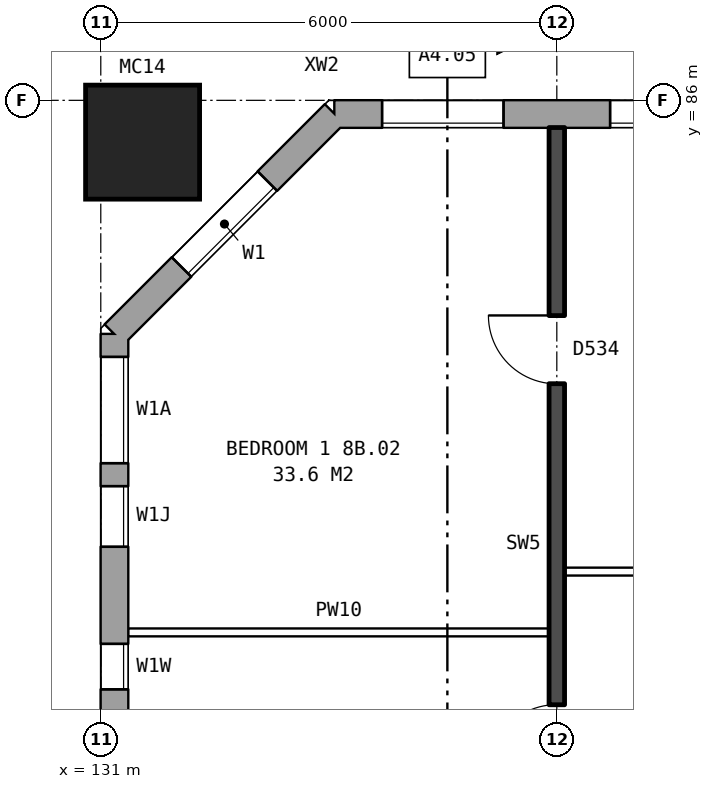
"""IFC4 building model, lengths in metres.
Left out: names, types, materials, properties, quantities, classifications, styles, units other than length and angle.
Written with IfcOpenShell. Run it as: python <this file> out.ifc"""

import sys

from ifc_helpers import new_model, si_unit, direction, frame, frame_2d, origin, origin_2d, place, context, subcontext, project, spatial, rectangle, hollow_rectangle, extrude, element, fill, save


model = new_model("IFC4")
c1 = context("Model", 3, precision=1e-05, world=origin(), true_north=direction((0.0, 1.0)))
c2 = subcontext(c1, "Body", "Model", "MODEL_VIEW")
j1 = project(units=[si_unit("LENGTHUNIT", "METRE"), si_unit("PLANEANGLEUNIT", "RADIAN")], contexts=[c1])
p1 = place(None, origin())
s1 = spatial("IfcSite", under=j1, at=p1, CompositionType="ELEMENT")
p2 = place(p1, origin())
s2 = spatial("IfcBuilding", under=s1, at=p2, CompositionType="ELEMENT")
p3 = place(p2, frame((0.0, 0.0, 31.9)))
s3 = spatial("IfcBuildingStorey", under=s2, at=p3, CompositionType="ELEMENT", Elevation=31.9)
p4 = place(p3, frame((131.55, 85.45, 0.0), z_axis=(0.0, 0.0, 1.0), x_axis=(1.0, 0.0, 0.0)))
e1 = element("IfcColumn", 1, at=p4, inside=s3, PredefinedType="COLUMN", context=c2, shape_type="SweptSolid", body=[
    extrude(hollow_rectangle(XDim=1.5, YDim=1.5, WallThickness=0.08, at=origin_2d()), origin(), (0.0, 0.0, 1.0), 3.1),
])
p5 = place(p3, frame((174.675, 85.82, 0.0), z_axis=(0.0, 0.0, 1.0), x_axis=(-1.0, 0.0, 0.0)))
e2 = element("IfcWall", 2, at=p5, inside=s3, PredefinedType="STANDARD", context=c2, shape_type="SweptSolid", body=[
    extrude(rectangle(XDim=40.601, YDim=0.36, at=frame_2d((20.3, 0.0))), origin(), (0.0, 0.0, 1.0), 2.85),
])
p6 = place(p5, frame((2.375, 0.0, 0.8)))
e3 = element("IfcOpeningElement", 3, at=p6, cuts=e2, PredefinedType="OPENING", context=c2, shape_type="SweptSolid", body=[
    extrude(rectangle(XDim=1.6, YDim=1.8, at=frame_2d((0.8, 0.9))), frame((0.0, 0.19, 0.0), z_axis=(0.0, -1.0, 0.0), x_axis=(1.0, 0.0, 0.0)), (0.0, 0.0, 1.0), 0.38),
])
p7 = place(p5, frame((5.375, 0.0, 0.8)))
e4 = element("IfcOpeningElement", 4, at=p7, cuts=e2, PredefinedType="OPENING", context=c2, shape_type="SweptSolid", body=[
    extrude(rectangle(XDim=1.6, YDim=1.8, at=frame_2d((0.8, 0.9))), frame((0.0, 0.19, 0.0), z_axis=(0.0, -1.0, 0.0), x_axis=(1.0, 0.0, 0.0)), (0.0, 0.0, 1.0), 0.38),
])
p8 = place(p5, frame((8.375, 0.0, 0.8)))
e5 = element("IfcOpeningElement", 5, at=p8, cuts=e2, PredefinedType="OPENING", context=c2, shape_type="SweptSolid", body=[
    extrude(rectangle(XDim=1.6, YDim=1.8, at=frame_2d((0.8, 0.9))), frame((0.0, 0.19, 0.0), z_axis=(0.0, -1.0, 0.0), x_axis=(1.0, 0.0, 0.0)), (0.0, 0.0, 1.0), 0.38),
])
p9 = place(p5, frame((11.375, 0.0, 0.8)))
e6 = element("IfcOpeningElement", 6, at=p9, cuts=e2, PredefinedType="OPENING", context=c2, shape_type="SweptSolid", body=[
    extrude(rectangle(XDim=1.6, YDim=1.8, at=frame_2d((0.8, 0.9))), frame((0.0, 0.19, 0.0), z_axis=(0.0, -1.0, 0.0), x_axis=(1.0, 0.0, 0.0)), (0.0, 0.0, 1.0), 0.38),
])
p10 = place(p5, frame((13.875, 0.0, 1.7)))
e7 = element("IfcOpeningElement", 7, at=p10, cuts=e2, PredefinedType="OPENING", context=c2, shape_type="SweptSolid", body=[
    extrude(rectangle(XDim=0.6, YDim=0.9, at=frame_2d((0.3, 0.45))), frame((0.0, 0.19, 0.0), z_axis=(0.0, -1.0, 0.0), x_axis=(1.0, 0.0, 0.0)), (0.0, 0.0, 1.0), 0.38),
])
p11 = place(p5, frame((17.375, 0.0, 0.8)))
e8 = element("IfcOpeningElement", 8, at=p11, cuts=e2, PredefinedType="OPENING", context=c2, shape_type="SweptSolid", body=[
    extrude(rectangle(XDim=1.6, YDim=1.8, at=frame_2d((0.8, 0.9))), frame((0.0, 0.19, 0.0), z_axis=(0.0, -1.0, 0.0), x_axis=(1.0, 0.0, 0.0)), (0.0, 0.0, 1.0), 0.38),
])
p12 = place(p5, frame((20.375, 0.0, 0.8)))
e9 = element("IfcOpeningElement", 9, at=p12, cuts=e2, PredefinedType="OPENING", context=c2, shape_type="SweptSolid", body=[
    extrude(rectangle(XDim=1.6, YDim=1.8, at=frame_2d((0.8, 0.9))), frame((0.0, 0.19, 0.0), z_axis=(0.0, -1.0, 0.0), x_axis=(1.0, 0.0, 0.0)), (0.0, 0.0, 1.0), 0.38),
])
p13 = place(p5, frame((22.825, 0.0, 0.55)))
e10 = element("IfcOpeningElement", 10, at=p13, cuts=e2, PredefinedType="OPENING", context=c2, shape_type="SweptSolid", body=[
    extrude(rectangle(XDim=1.2, YDim=1.8, at=frame_2d((0.6, 0.9))), frame((0.0, 0.19, 0.0), z_axis=(0.0, -1.0, 0.0), x_axis=(1.0, 0.0, 0.0)), (0.0, 0.0, 1.0), 0.38),
])
p14 = place(p5, frame((26.075, 0.0, 1.7)))
e11 = element("IfcOpeningElement", 11, at=p14, cuts=e2, PredefinedType="OPENING", context=c2, shape_type="SweptSolid", body=[
    extrude(rectangle(XDim=0.8, YDim=0.9, at=frame_2d((0.4, 0.45))), frame((0.0, 0.19, 0.0), z_axis=(0.0, -1.0, 0.0), x_axis=(1.0, 0.0, 0.0)), (0.0, 0.0, 1.0), 0.38),
])
p15 = place(p5, frame((29.375, 0.0, 0.8)))
e12 = element("IfcOpeningElement", 12, at=p15, cuts=e2, PredefinedType="OPENING", context=c2, shape_type="SweptSolid", body=[
    extrude(rectangle(XDim=1.6, YDim=1.8, at=frame_2d((0.8, 0.9))), frame((0.0, 0.19, 0.0), z_axis=(0.0, -1.0, 0.0), x_axis=(1.0, 0.0, 0.0)), (0.0, 0.0, 1.0), 0.38),
])
p16 = place(p5, frame((32.375, 0.0, 0.8)))
e13 = element("IfcOpeningElement", 13, at=p16, cuts=e2, PredefinedType="OPENING", context=c2, shape_type="SweptSolid", body=[
    extrude(rectangle(XDim=1.6, YDim=1.8, at=frame_2d((0.8, 0.9))), frame((0.0, 0.19, 0.0), z_axis=(0.0, -1.0, 0.0), x_axis=(1.0, 0.0, 0.0)), (0.0, 0.0, 1.0), 0.38),
])
p17 = place(p5, frame((35.375, 0.0, 0.8)))
e14 = element("IfcOpeningElement", 14, at=p17, cuts=e2, PredefinedType="OPENING", context=c2, shape_type="SweptSolid", body=[
    extrude(rectangle(XDim=1.6, YDim=1.8, at=frame_2d((0.8, 0.9))), frame((0.0, 0.19, 0.0), z_axis=(0.0, -1.0, 0.0), x_axis=(1.0, 0.0, 0.0)), (0.0, 0.0, 1.0), 0.38),
])
p18 = place(p5, frame((38.375, 0.0, 0.8)))
e15 = element("IfcOpeningElement", 15, at=p18, cuts=e2, PredefinedType="OPENING", context=c2, shape_type="SweptSolid", body=[
    extrude(rectangle(XDim=1.6, YDim=1.8, at=frame_2d((0.8, 0.9))), frame((0.0, 0.19, 0.0), z_axis=(0.0, -1.0, 0.0), x_axis=(1.0, 0.0, 0.0)), (0.0, 0.0, 1.0), 0.38),
])
p19 = place(p5, frame((15.775, 0.0, 0.8)))
e16 = element("IfcOpeningElement", 16, at=p19, cuts=e2, PredefinedType="OPENING", context=c2, shape_type="SweptSolid", body=[
    extrude(rectangle(XDim=1.2, YDim=0.9, at=frame_2d((0.6, 0.45))), frame((0.0, 0.19, 0.0), z_axis=(0.0, -1.0, 0.0), x_axis=(1.0, 0.0, 0.0)), (0.0, 0.0, 1.0), 0.38),
])
p20 = place(p5, frame((24.325, 0.0, 0.55)))
e17 = element("IfcOpeningElement", 17, at=p20, cuts=e2, PredefinedType="OPENING", context=c2, shape_type="SweptSolid", body=[
    extrude(rectangle(XDim=0.8, YDim=0.9, at=frame_2d((0.4, 0.45))), frame((0.0, 0.19, 0.0), z_axis=(0.0, -1.0, 0.0), x_axis=(1.0, 0.0, 0.0)), (0.0, 0.0, 1.0), 0.38),
])
p21 = place(p5, frame((27.175, 0.0, 0.8)))
e18 = element("IfcOpeningElement", 18, at=p21, cuts=e2, PredefinedType="OPENING", context=c2, shape_type="SweptSolid", body=[
    extrude(rectangle(XDim=1.2, YDim=1.8, at=frame_2d((0.6, 0.9))), frame((0.0, 0.19, 0.0), z_axis=(0.0, -1.0, 0.0), x_axis=(1.0, 0.0, 0.0)), (0.0, 0.0, 1.0), 0.38),
])
p22 = place(p3, frame((134.075, 85.82, 0.0), z_axis=(0.0, 0.0, 1.0), x_axis=(-0.707106781187, -0.707106781187, 0.0)))
e19 = element("IfcWall", 19, at=p22, inside=s3, PredefinedType="STANDARD", context=c2, shape_type="SweptSolid", body=[
    extrude(rectangle(XDim=4.094, YDim=0.36, at=frame_2d((2.047, 0.0))), origin(), (0.0, 0.0, 1.0), 2.85),
])
p23 = place(p22, frame((1.247, 0.0, 0.8)))
e20 = element("IfcOpeningElement", 20, at=p23, cuts=e19, PredefinedType="OPENING", context=c2, shape_type="SweptSolid", body=[
    extrude(rectangle(XDim=1.6, YDim=1.8, at=frame_2d((0.8, 0.9))), frame((0.0, 0.19, 0.0), z_axis=(0.0, -1.0, 0.0), x_axis=(1.0, 0.0, 0.0)), (0.0, 0.0, 1.0), 0.38),
])
p24 = place(p3, frame((131.18, 82.925, 0.0), z_axis=(0.0, 0.0, 1.0), x_axis=(0.0, -1.0, 0.0)))
e21 = element("IfcWall", 21, at=p24, inside=s3, PredefinedType="STANDARD", context=c2, shape_type="SweptSolid", body=[
    extrude(rectangle(XDim=25.851, YDim=0.36, at=frame_2d((12.925, 0.0))), origin(), (0.0, 0.0, 1.0), 2.85),
])
p25 = place(p24, frame((0.3, 0.0, 0.8)))
e22 = element("IfcOpeningElement", 22, at=p25, cuts=e21, PredefinedType="OPENING", context=c2, shape_type="SweptSolid", body=[
    extrude(rectangle(XDim=1.4, YDim=1.8, at=frame_2d((0.7, 0.9))), frame((0.0, 0.19, 0.0), z_axis=(0.0, -1.0, 0.0), x_axis=(1.0, 0.0, 0.0)), (0.0, 0.0, 1.0), 0.38),
])
p26 = place(p24, frame((4.075, 0.0, 0.25)))
e23 = element("IfcOpeningElement", 23, at=p26, cuts=e21, PredefinedType="OPENING", context=c2, shape_type="SweptSolid", body=[
    extrude(rectangle(XDim=0.6, YDim=0.9, at=frame_2d((0.3, 0.45))), frame((0.0, 0.19, 0.0), z_axis=(0.0, -1.0, 0.0), x_axis=(1.0, 0.0, 0.0)), (0.0, 0.0, 1.0), 0.38),
])
p27 = place(p24, frame((19.225, 0.0, 1.6)))
e24 = element("IfcOpeningElement", 24, at=p27, cuts=e21, PredefinedType="OPENING", context=c2, shape_type="SweptSolid", body=[
    extrude(rectangle(XDim=1.4, YDim=0.9, at=frame_2d((0.7, 0.45))), frame((0.0, 0.19, 0.0), z_axis=(0.0, -1.0, 0.0), x_axis=(1.0, 0.0, 0.0)), (0.0, 0.0, 1.0), 0.38),
])
p28 = place(p24, frame((22.025, 0.0, 0.8)))
e25 = element("IfcOpeningElement", 25, at=p28, cuts=e21, PredefinedType="OPENING", context=c2, shape_type="SweptSolid", body=[
    extrude(rectangle(XDim=1.2, YDim=0.9, at=frame_2d((0.6, 0.45))), frame((0.0, 0.19, 0.0), z_axis=(0.0, -1.0, 0.0), x_axis=(1.0, 0.0, 0.0)), (0.0, 0.0, 1.0), 0.38),
])
p29 = place(p24, frame((2.0, 0.0, 0.8)))
e26 = element("IfcOpeningElement", 26, at=p29, cuts=e21, PredefinedType="OPENING", context=c2, shape_type="SweptSolid", body=[
    extrude(rectangle(XDim=0.8, YDim=1.5, at=frame_2d((0.4, 0.75))), frame((0.0, 0.19, 0.0), z_axis=(0.0, -1.0, 0.0), x_axis=(1.0, 0.0, 0.0)), (0.0, 0.0, 1.0), 0.38),
])
p30 = place(p24, frame((5.125, 0.0, 1.65)))
e27 = element("IfcOpeningElement", 27, at=p30, cuts=e21, PredefinedType="OPENING", context=c2, shape_type="SweptSolid", body=[
    extrude(rectangle(XDim=1.4, YDim=0.9, at=frame_2d((0.7, 0.45))), frame((0.0, 0.19, 0.0), z_axis=(0.0, -1.0, 0.0), x_axis=(1.0, 0.0, 0.0)), (0.0, 0.0, 1.0), 0.38),
])
p31 = place(p24, frame((23.575, 0.0, 0.8)))
e28 = element("IfcOpeningElement", 28, at=p31, cuts=e21, PredefinedType="OPENING", context=c2, shape_type="SweptSolid", body=[
    extrude(rectangle(XDim=1.2, YDim=1.8, at=frame_2d((0.6, 0.9))), frame((0.0, 0.19, 0.0), z_axis=(0.0, -1.0, 0.0), x_axis=(1.0, 0.0, 0.0)), (0.0, 0.0, 1.0), 0.38),
])
p32 = place(p3, frame((131.36, 79.0, 0.0), z_axis=(0.0, 0.0, 1.0), x_axis=(1.0, 0.0, 0.0)))
e29 = element("IfcWall", 29, at=p32, inside=s3, PredefinedType="PARTITIONING", context=c2, shape_type="SweptSolid", body=[
    extrude(rectangle(XDim=5.54, YDim=0.1, at=frame_2d((2.77, 0.0))), origin(), (0.0, 0.0, 1.0), 2.85),
])
p33 = place(p3, frame((137.1, 79.8, 0.0), z_axis=(0.0, 0.0, 1.0), x_axis=(1.0, 0.0, 0.0)))
e30 = element("IfcWall", 30, at=p33, inside=s3, PredefinedType="PARTITIONING", context=c2, shape_type="SweptSolid", body=[
    extrude(rectangle(XDim=5.8, YDim=0.1, at=frame_2d((2.9, 0.0))), origin(), (0.0, 0.0, 1.0), 2.85),
])
p34 = place(p33, frame((1.3, 0.0, 0.0)))
e31 = element("IfcOpeningElement", 31, at=p34, cuts=e30, PredefinedType="OPENING", context=c2, shape_type="SweptSolid", body=[
    extrude(rectangle(XDim=0.9, YDim=2.1, at=frame_2d((0.45, 1.05))), frame((0.0, 0.06, 0.0), z_axis=(0.0, -1.0, 0.0), x_axis=(1.0, 0.0, 0.0)), (0.0, 0.0, 1.0), 0.12),
])
p35 = place(p33, frame((4.2, 0.0, 0.0)))
e32 = element("IfcOpeningElement", 32, at=p35, cuts=e30, PredefinedType="OPENING", context=c2, shape_type="SweptSolid", body=[
    extrude(rectangle(XDim=0.9, YDim=2.1, at=frame_2d((0.45, 1.05))), frame((0.0, 0.06, 0.0), z_axis=(0.0, -1.0, 0.0), x_axis=(1.0, 0.0, 0.0)), (0.0, 0.0, 1.0), 0.12),
])
p36 = place(p3, frame((137.0, 76.2, 0.0), z_axis=(0.0, 0.0, 1.0), x_axis=(0.0, 1.0, 0.0)))
e33 = element("IfcWall", 33, at=p36, inside=s3, PredefinedType="SOLIDWALL", context=c2, shape_type="SweptSolid", body=[
    extrude(rectangle(XDim=9.44, YDim=0.2, at=frame_2d((4.72, 0.0))), origin(), (0.0, 0.0, 1.0), 2.85),
])
p37 = place(p36, frame((6.07, 0.0, 0.0)))
e34 = element("IfcOpeningElement", 34, at=p37, cuts=e33, PredefinedType="OPENING", context=c2, shape_type="SweptSolid", body=[
    extrude(rectangle(XDim=0.9, YDim=2.1, at=frame_2d((0.45, 1.05))), frame((0.0, 0.11, 0.0), z_axis=(0.0, -1.0, 0.0), x_axis=(1.0, 0.0, 0.0)), (0.0, 0.0, 1.0), 0.22),
])
p38 = place(p36, frame((0.95, 0.0, 0.0)))
e35 = element("IfcOpeningElement", 35, at=p38, cuts=e33, PredefinedType="OPENING", context=c2, shape_type="SweptSolid", body=[
    extrude(rectangle(XDim=0.9, YDim=2.1, at=frame_2d((0.45, 1.05))), frame((0.0, 0.11, 0.0), z_axis=(0.0, -1.0, 0.0), x_axis=(1.0, 0.0, 0.0)), (0.0, 0.0, 1.0), 0.22),
])
p39 = place(p17, origin())
e36 = element("IfcWindow", 36, at=p39, inside=s3, PartitioningType="SINGLE_PANEL", PredefinedType="WINDOW", context=c2, shape_type="SweptSolid", body=[
    extrude(rectangle(XDim=1.6, YDim=1.8, at=frame_2d((0.8, 0.9))), frame((0.0, 0.15, 0.0), z_axis=(0.0, -1.0, 0.0), x_axis=(1.0, 0.0, 0.0)), (0.0, 0.0, 1.0), 0.06),
])
fill(e14, e36)
p40 = place(p18, origin())
e37 = element("IfcWindow", 37, at=p40, inside=s3, PartitioningType="SINGLE_PANEL", PredefinedType="WINDOW", context=c2, shape_type="SweptSolid", body=[
    extrude(rectangle(XDim=1.6, YDim=1.8, at=frame_2d((0.8, 0.9))), frame((0.0, 0.15, 0.0), z_axis=(0.0, -1.0, 0.0), x_axis=(1.0, 0.0, 0.0)), (0.0, 0.0, 1.0), 0.06),
])
fill(e15, e37)
p41 = place(p23, origin())
e38 = element("IfcWindow", 38, at=p41, inside=s3, PartitioningType="SINGLE_PANEL", PredefinedType="WINDOW", context=c2, shape_type="SweptSolid", body=[
    extrude(rectangle(XDim=1.6, YDim=1.8, at=frame_2d((0.8, 0.9))), frame((0.0, 0.15, 0.0), z_axis=(0.0, -1.0, 0.0), x_axis=(1.0, 0.0, 0.0)), (0.0, 0.0, 1.0), 0.06),
])
fill(e20, e38)
p42 = place(p25, origin())
e39 = element("IfcWindow", 39, at=p42, inside=s3, PartitioningType="SINGLE_PANEL", PredefinedType="WINDOW", context=c2, shape_type="SweptSolid", body=[
    extrude(rectangle(XDim=1.4, YDim=1.8, at=frame_2d((0.7, 0.9))), frame((0.0, 0.15, 0.0), z_axis=(0.0, -1.0, 0.0), x_axis=(1.0, 0.0, 0.0)), (0.0, 0.0, 1.0), 0.06),
])
fill(e22, e39)
p43 = place(p26, origin())
e40 = element("IfcWindow", 40, at=p43, inside=s3, PartitioningType="SINGLE_PANEL", PredefinedType="WINDOW", context=c2, shape_type="SweptSolid", body=[
    extrude(rectangle(XDim=0.6, YDim=0.9, at=frame_2d((0.3, 0.45))), frame((0.0, 0.15, 0.0), z_axis=(0.0, -1.0, 0.0), x_axis=(1.0, 0.0, 0.0)), (0.0, 0.0, 1.0), 0.06),
])
fill(e23, e40)
p44 = place(p37, origin())
e41 = element("IfcDoor", 41, at=p44, inside=s3, OperationType="SINGLE_SWING_RIGHT", PredefinedType="DOOR", context=c2, shape_type="SweptSolid", body=[
    extrude(rectangle(XDim=0.9, YDim=2.1, at=frame_2d((0.45, 1.05))), frame((0.0, 0.025, 0.0), z_axis=(0.0, -1.0, 0.0), x_axis=(1.0, 0.0, 0.0)), (0.0, 0.0, 1.0), 0.05),
])
fill(e34, e41)
p45 = place(p38, origin())
e42 = element("IfcDoor", 42, at=p45, inside=s3, OperationType="SINGLE_SWING_LEFT", PredefinedType="DOOR", context=c2, shape_type="SweptSolid", body=[
    extrude(rectangle(XDim=0.9, YDim=2.1, at=frame_2d((0.45, 1.05))), frame((0.0, 0.025, 0.0), z_axis=(0.0, -1.0, 0.0), x_axis=(1.0, 0.0, 0.0)), (0.0, 0.0, 1.0), 0.05),
])
fill(e35, e42)
p46 = place(p29, origin())
e43 = element("IfcWindow", 43, at=p46, inside=s3, PartitioningType="SINGLE_PANEL", PredefinedType="WINDOW", context=c2, shape_type="SweptSolid", body=[
    extrude(rectangle(XDim=0.8, YDim=1.5, at=frame_2d((0.4, 0.75))), frame((0.0, 0.15, 0.0), z_axis=(0.0, -1.0, 0.0), x_axis=(1.0, 0.0, 0.0)), (0.0, 0.0, 1.0), 0.06),
])
fill(e26, e43)
save(model, sys.argv[1])
